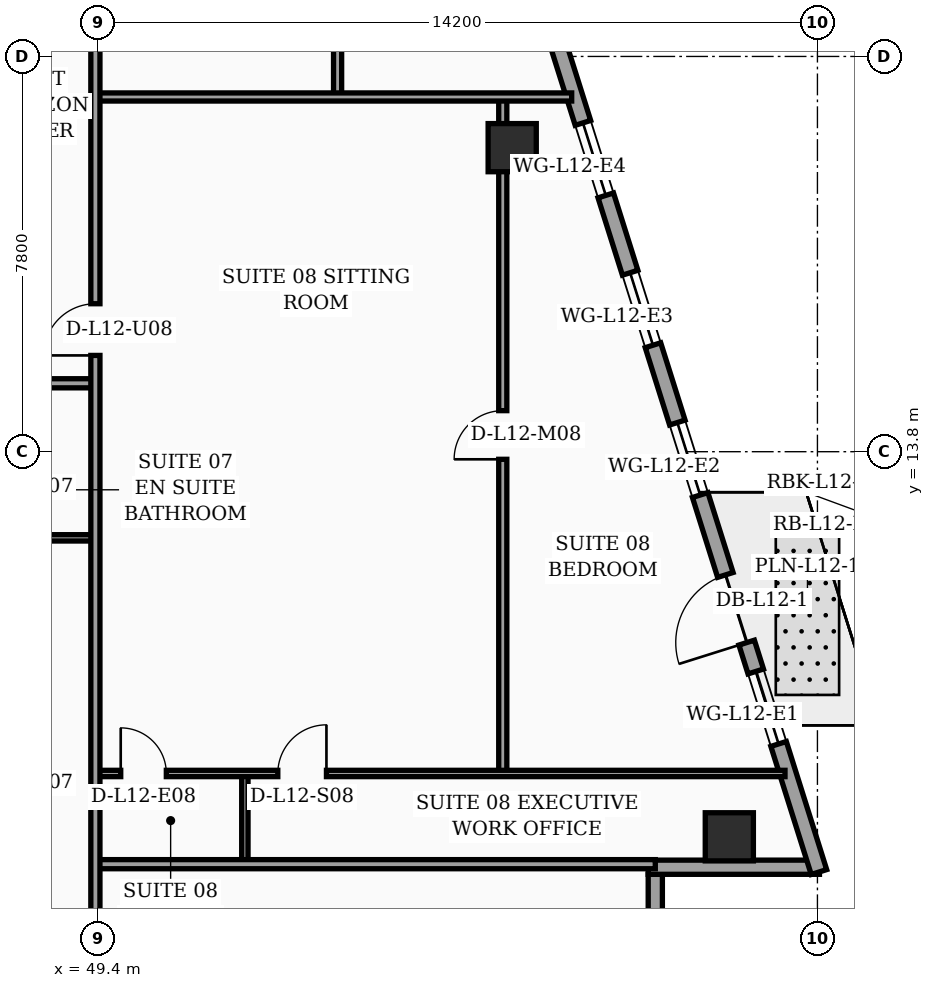
"""IFC4 building model, lengths in metres.
Left out: names, types, materials, properties, quantities, classifications, styles, units other than length and angle.
Written with IfcOpenShell. Run it as: python <this file> out.ifc"""

import sys

from ifc_helpers import new_model, si_unit, direction, frame, frame_2d, origin, origin_2d, place, context, subcontext, project, spatial, rectangle, hollow_rectangle, extrude, element, fill, save


model = new_model("IFC4")
c1 = context("Model", 3, precision=1e-05, world=origin(), true_north=direction((0.0, 1.0)))
c2 = subcontext(c1, "Body", "Model", "MODEL_VIEW")
j1 = project(units=[si_unit("LENGTHUNIT", "METRE"), si_unit("PLANEANGLEUNIT", "RADIAN")], contexts=[c1])
p1 = place(None, origin())
s1 = spatial("IfcSite", under=j1, at=p1, CompositionType="ELEMENT")
p2 = place(p1, origin())
s2 = spatial("IfcBuilding", under=s1, at=p2, CompositionType="ELEMENT")
p3 = place(p2, frame((0.0, 0.0, 54.6)))
s3 = spatial("IfcBuildingStorey", under=s2, at=p3, CompositionType="ELEMENT", Elevation=54.6)
for number, where, z_axis, x_axis in (
    (1, (61.861, 6.2, 0.0), (0.0, 0.0, 1.0), (1.0, 0.0, 0.0)),
    (2, (57.576, 19.8, 0.0), (0.0, 0.0, 1.0), (1.0, 0.0, 0.0)),
):
    element("IfcColumn", number, at=place(p3, frame(where, z_axis=z_axis, x_axis=x_axis)), inside=s3, PredefinedType="COLUMN", context=c2, shape_type="SweptSolid", body=[
        extrude(hollow_rectangle(XDim=0.95, YDim=0.95, WallThickness=0.04, at=origin_2d()), origin(), (0.0, 0.0, 1.0), 3.56),
    ])
p4 = place(p3, frame((60.4, 2.52, 0.0), z_axis=(0.0, 0.0, 1.0), x_axis=(0.0, 1.0, 0.0)))
e3 = element("IfcWall", 3, at=p4, inside=s3, PredefinedType="SOLIDWALL", context=c2, shape_type="SweptSolid", body=[
    extrude(rectangle(XDim=2.94, YDim=0.28, at=frame_2d((1.47, 0.0))), origin(), (0.0, 0.0, 1.0), 3.04),
])
p5 = place(p3, frame((60.26, 5.6, 0.0), z_axis=(0.0, 0.0, 1.0), x_axis=(1.0, 0.0, 0.0)))
e4 = element("IfcWall", 4, at=p5, inside=s3, PredefinedType="SOLIDWALL", context=c2, shape_type="SweptSolid", body=[
    extrude(rectangle(XDim=3.38, YDim=0.28, at=frame_2d((1.69, 0.0))), origin(), (0.0, 0.0, 1.0), 3.04),
])
p6 = place(p3, frame((63.63, 5.505, 0.0), z_axis=(0.0, 0.0, 1.0), x_axis=(-0.300501856448, 0.953781229775, 0.0)))
e5 = element("IfcWall", 5, at=p6, inside=s3, PredefinedType="SOLIDWALL", context=c2, shape_type="SweptSolid", body=[
    extrude(rectangle(XDim=30.814, YDim=0.32, at=frame_2d((15.407, 0.0))), origin(), (0.0, 0.0, 1.0), 3.56),
])
p7 = place(p6, frame((4.747, 0.0, 0.0)))
e6 = element("IfcOpeningElement", 6, at=p7, cuts=e5, PredefinedType="OPENING", context=c2, shape_type="SweptSolid", body=[
    extrude(rectangle(XDim=1.4, YDim=2.25, at=frame_2d((0.7, 1.125))), frame((0.0, 0.17, 0.0), z_axis=(0.0, -1.0, 0.0), x_axis=(1.0, 0.0, 0.0)), (0.0, 0.0, 1.0), 0.34),
])
p8 = place(p6, frame((2.65, 0.0, 0.75)))
e7 = element("IfcOpeningElement", 7, at=p8, cuts=e5, PredefinedType="OPENING", context=c2, shape_type="SweptSolid", body=[
    extrude(rectangle(XDim=1.5, YDim=1.6, at=frame_2d((0.75, 0.8))), frame((0.0, 0.17, 0.0), z_axis=(0.0, -1.0, 0.0), x_axis=(1.0, 0.0, 0.0)), (0.0, 0.0, 1.0), 0.34),
])
p9 = place(p6, frame((7.8, 0.0, 0.75)))
e8 = element("IfcOpeningElement", 8, at=p9, cuts=e5, PredefinedType="OPENING", context=c2, shape_type="SweptSolid", body=[
    extrude(rectangle(XDim=1.5, YDim=1.6, at=frame_2d((0.75, 0.8))), frame((0.0, 0.17, 0.0), z_axis=(0.0, -1.0, 0.0), x_axis=(1.0, 0.0, 0.0)), (0.0, 0.0, 1.0), 0.34),
])
p10 = place(p6, frame((10.9, 0.0, 0.75)))
e9 = element("IfcOpeningElement", 9, at=p10, cuts=e5, PredefinedType="OPENING", context=c2, shape_type="SweptSolid", body=[
    extrude(rectangle(XDim=1.5, YDim=1.6, at=frame_2d((0.75, 0.8))), frame((0.0, 0.17, 0.0), z_axis=(0.0, -1.0, 0.0), x_axis=(1.0, 0.0, 0.0)), (0.0, 0.0, 1.0), 0.34),
])
p11 = place(p6, frame((14.0, 0.0, 0.75)))
e10 = element("IfcOpeningElement", 10, at=p11, cuts=e5, PredefinedType="OPENING", context=c2, shape_type="SweptSolid", body=[
    extrude(rectangle(XDim=1.5, YDim=1.6, at=frame_2d((0.75, 0.8))), frame((0.0, 0.17, 0.0), z_axis=(0.0, -1.0, 0.0), x_axis=(1.0, 0.0, 0.0)), (0.0, 0.0, 1.0), 0.34),
])
p12 = place(p6, frame((17.1, 0.0, 0.75)))
e11 = element("IfcOpeningElement", 11, at=p12, cuts=e5, PredefinedType="OPENING", context=c2, shape_type="SweptSolid", body=[
    extrude(rectangle(XDim=1.5, YDim=1.6, at=frame_2d((0.75, 0.8))), frame((0.0, 0.17, 0.0), z_axis=(0.0, -1.0, 0.0), x_axis=(1.0, 0.0, 0.0)), (0.0, 0.0, 1.0), 0.34),
])
p13 = place(p6, frame((20.2, 0.0, 0.75)))
e12 = element("IfcOpeningElement", 12, at=p13, cuts=e5, PredefinedType="OPENING", context=c2, shape_type="SweptSolid", body=[
    extrude(rectangle(XDim=1.5, YDim=1.6, at=frame_2d((0.75, 0.8))), frame((0.0, 0.17, 0.0), z_axis=(0.0, -1.0, 0.0), x_axis=(1.0, 0.0, 0.0)), (0.0, 0.0, 1.0), 0.34),
])
p14 = place(p6, frame((26.4, 0.0, 0.75)))
e13 = element("IfcOpeningElement", 13, at=p14, cuts=e5, PredefinedType="OPENING", context=c2, shape_type="SweptSolid", body=[
    extrude(rectangle(XDim=1.5, YDim=1.6, at=frame_2d((0.75, 0.8))), frame((0.0, 0.17, 0.0), z_axis=(0.0, -1.0, 0.0), x_axis=(1.0, 0.0, 0.0)), (0.0, 0.0, 1.0), 0.34),
])
p15 = place(p3, frame((47.42, 12.1, 0.0), z_axis=(0.0, 0.0, 1.0), x_axis=(1.0, 0.0, 0.0)))
e14 = element("IfcWall", 14, at=p15, inside=s3, PredefinedType="PARTITIONING", context=c2, shape_type="SweptSolid", body=[
    extrude(rectangle(XDim=1.93, YDim=0.125, at=frame_2d((0.965, 0.0))), origin(), (0.0, 0.0, 1.0), 2.84),
])
p16 = place(p3, frame((32.4, 15.15, 0.0), z_axis=(0.0, 0.0, 1.0), x_axis=(1.0, 0.0, 0.0)))
e15 = element("IfcWall", 15, at=p16, inside=s3, PredefinedType="PARTITIONING", context=c2, shape_type="SweptSolid", body=[
    extrude(rectangle(XDim=16.95, YDim=0.18, at=frame_2d((8.475, 0.0))), origin(), (0.0, 0.0, 1.0), 2.84),
])
p17 = place(p16, frame((1.99, 0.0, 0.0)))
e16 = element("IfcOpeningElement", 16, at=p17, cuts=e15, PredefinedType="OPENING", context=c2, shape_type="SweptSolid", body=[
    extrude(rectangle(XDim=1.02, YDim=2.2, at=frame_2d((0.51, 1.1))), frame((0.0, 0.1, 0.0), z_axis=(0.0, -1.0, 0.0), x_axis=(1.0, 0.0, 0.0)), (0.0, 0.0, 1.0), 0.2),
])
p18 = place(p16, frame((7.58, 0.0, 0.0)))
e17 = element("IfcOpeningElement", 17, at=p18, cuts=e15, PredefinedType="OPENING", context=c2, shape_type="SweptSolid", body=[
    extrude(rectangle(XDim=1.02, YDim=2.2, at=frame_2d((0.51, 1.1))), frame((0.0, 0.1, 0.0), z_axis=(0.0, -1.0, 0.0), x_axis=(1.0, 0.0, 0.0)), (0.0, 0.0, 1.0), 0.2),
])
p19 = place(p16, frame((12.69, 0.0, 0.0)))
e18 = element("IfcOpeningElement", 18, at=p19, cuts=e15, PredefinedType="OPENING", context=c2, shape_type="SweptSolid", body=[
    extrude(rectangle(XDim=1.02, YDim=2.2, at=frame_2d((0.51, 1.1))), frame((0.0, 0.1, 0.0), z_axis=(0.0, -1.0, 0.0), x_axis=(1.0, 0.0, 0.0)), (0.0, 0.0, 1.0), 0.2),
])
p20 = place(p3, frame((52.3, 5.66, 0.0), z_axis=(0.0, 0.0, 1.0), x_axis=(0.0, 1.0, 0.0)))
e19 = element("IfcWall", 19, at=p20, inside=s3, PredefinedType="PARTITIONING", context=c2, shape_type="SweptSolid", body=[
    extrude(rectangle(XDim=1.79, YDim=0.125, at=frame_2d((0.895, 0.0))), origin(), (0.0, 0.0, 1.0), 3.56),
])
p21 = place(p3, frame((57.39, 7.45, 0.0), z_axis=(0.0, 0.0, 1.0), x_axis=(0.0, 1.0, 0.0)))
e20 = element("IfcWall", 20, at=p21, inside=s3, PredefinedType="PARTITIONING", context=c2, shape_type="SweptSolid", body=[
    extrude(rectangle(XDim=13.35, YDim=0.16, at=frame_2d((6.675, 0.0))), origin(), (0.0, 0.0, 1.0), 2.84),
])
p22 = place(p21, frame((6.2, 0.0, 0.0)))
e21 = element("IfcOpeningElement", 21, at=p22, cuts=e20, PredefinedType="OPENING", context=c2, shape_type="SweptSolid", body=[
    extrude(rectangle(XDim=0.96, YDim=2.2, at=frame_2d((0.48, 1.1))), frame((0.0, 0.09, 0.0), z_axis=(0.0, -1.0, 0.0), x_axis=(1.0, 0.0, 0.0)), (0.0, 0.0, 1.0), 0.18),
])
p23 = place(p3, frame((49.35, 7.45, 0.0), z_axis=(0.0, 0.0, 1.0), x_axis=(1.0, 0.0, 0.0)))
e22 = element("IfcWall", 22, at=p23, inside=s3, PredefinedType="PARTITIONING", context=c2, shape_type="SweptSolid", body=[
    extrude(rectangle(XDim=13.61, YDim=0.125, at=frame_2d((6.805, 0.0))), origin(), (0.0, 0.0, 1.0), 3.04),
])
p24 = place(p23, frame((0.5, 0.0, 0.0)))
e23 = element("IfcOpeningElement", 23, at=p24, cuts=e22, PredefinedType="OPENING", context=c2, shape_type="SweptSolid", body=[
    extrude(rectangle(XDim=0.9, YDim=2.15, at=frame_2d((0.45, 1.075))), frame((0.0, 0.073, 0.0), z_axis=(0.0, -1.0, 0.0), x_axis=(1.0, 0.0, 0.0)), (0.0, 0.0, 1.0), 0.145),
])
p25 = place(p23, frame((3.6, 0.0, 0.0)))
e24 = element("IfcOpeningElement", 24, at=p25, cuts=e22, PredefinedType="OPENING", context=c2, shape_type="SweptSolid", body=[
    extrude(rectangle(XDim=0.96, YDim=2.2, at=frame_2d((0.48, 1.1))), frame((0.0, 0.073, 0.0), z_axis=(0.0, -1.0, 0.0), x_axis=(1.0, 0.0, 0.0)), (0.0, 0.0, 1.0), 0.145),
])
p26 = place(p3, frame((49.35, 5.66, 0.0), z_axis=(0.0, 0.0, 1.0), x_axis=(1.0, 0.0, 0.0)))
e25 = element("IfcWall", 25, at=p26, inside=s3, PredefinedType="PARTITIONING", context=c2, shape_type="SweptSolid", body=[
    extrude(rectangle(XDim=11.05, YDim=0.18, at=frame_2d((5.525, 0.0))), origin(), (0.0, 0.0, 1.0), 2.84),
])
p27 = place(p3, frame((54.13, 20.8, 0.0), z_axis=(0.0, 0.0, 1.0), x_axis=(0.0, 1.0, 0.0)))
e26 = element("IfcWall", 26, at=p27, inside=s3, PredefinedType="PARTITIONING", context=c2, shape_type="SweptSolid", body=[
    extrude(rectangle(XDim=7.35, YDim=0.16, at=frame_2d((3.675, 0.0))), origin(), (0.0, 0.0, 1.0), 3.19),
])
p28 = place(p27, frame((3.19, 0.0, 0.0)))
e27 = element("IfcOpeningElement", 27, at=p28, cuts=e26, PredefinedType="OPENING", context=c2, shape_type="SweptSolid", body=[
    extrude(rectangle(XDim=0.96, YDim=2.2, at=frame_2d((0.48, 1.1))), frame((0.0, 0.09, 0.0), z_axis=(0.0, -1.0, 0.0), x_axis=(1.0, 0.0, 0.0)), (0.0, 0.0, 1.0), 0.18),
])
p29 = place(p3, frame((49.35, 20.8, 0.0), z_axis=(0.0, 0.0, 1.0), x_axis=(1.0, 0.0, 0.0)))
e28 = element("IfcWall", 28, at=p29, inside=s3, PredefinedType="PARTITIONING", context=c2, shape_type="SweptSolid", body=[
    extrude(rectangle(XDim=9.4, YDim=0.16, at=frame_2d((4.7, 0.0))), origin(), (0.0, 0.0, 1.0), 3.04),
])
p30 = place(p3, frame((49.35, 2.44, 0.0), z_axis=(0.0, 0.0, 1.0), x_axis=(0.0, 1.0, 0.0)))
e29 = element("IfcWall", 29, at=p30, inside=s3, PredefinedType="PARTITIONING", context=c2, shape_type="SweptSolid", body=[
    extrude(rectangle(XDim=27.84, YDim=0.18, at=frame_2d((13.92, 0.0))), origin(), (0.0, 0.0, 1.0), 2.84),
])
p31 = place(p30, frame((13.26, 0.0, 0.0)))
e30 = element("IfcOpeningElement", 30, at=p31, cuts=e29, PredefinedType="OPENING", context=c2, shape_type="SweptSolid", body=[
    extrude(rectangle(XDim=1.02, YDim=2.2, at=frame_2d((0.51, 1.1))), frame((0.0, 0.1, 0.0), z_axis=(0.0, -1.0, 0.0), x_axis=(1.0, 0.0, 0.0)), (0.0, 0.0, 1.0), 0.2),
])
p32 = place(p30, frame((21.52, 0.0, 0.0)))
e31 = element("IfcOpeningElement", 31, at=p32, cuts=e29, PredefinedType="OPENING", context=c2, shape_type="SweptSolid", body=[
    extrude(rectangle(XDim=1.02, YDim=2.2, at=frame_2d((0.51, 1.1))), frame((0.0, 0.1, 0.0), z_axis=(0.0, -1.0, 0.0), x_axis=(1.0, 0.0, 0.0)), (0.0, 0.0, 1.0), 0.2),
])
p33 = place(p7, origin())
e32 = element("IfcDoor", 32, at=p33, inside=s3, OperationType="SINGLE_SWING_LEFT", PredefinedType="DOOR", context=c2, shape_type="SweptSolid", body=[
    extrude(rectangle(XDim=1.4, YDim=2.25, at=frame_2d((0.7, 1.125))), frame((0.0, 0.025, 0.0), z_axis=(0.0, -1.0, 0.0), x_axis=(1.0, 0.0, 0.0)), (0.0, 0.0, 1.0), 0.05),
])
fill(e6, e32)
p34 = place(p8, origin())
e33 = element("IfcWindow", 33, at=p34, inside=s3, PartitioningType="SINGLE_PANEL", PredefinedType="WINDOW", context=c2, shape_type="SweptSolid", body=[
    extrude(rectangle(XDim=1.5, YDim=1.6, at=frame_2d((0.75, 0.8))), frame((0.0, 0.03, 0.0), z_axis=(0.0, -1.0, 0.0), x_axis=(1.0, 0.0, 0.0)), (0.0, 0.0, 1.0), 0.06),
])
fill(e7, e33)
p35 = place(p9, origin())
e34 = element("IfcWindow", 34, at=p35, inside=s3, PartitioningType="SINGLE_PANEL", PredefinedType="WINDOW", context=c2, shape_type="SweptSolid", body=[
    extrude(rectangle(XDim=1.5, YDim=1.6, at=frame_2d((0.75, 0.8))), frame((0.0, 0.03, 0.0), z_axis=(0.0, -1.0, 0.0), x_axis=(1.0, 0.0, 0.0)), (0.0, 0.0, 1.0), 0.06),
])
fill(e8, e34)
p36 = place(p10, origin())
e35 = element("IfcWindow", 35, at=p36, inside=s3, PartitioningType="SINGLE_PANEL", PredefinedType="WINDOW", context=c2, shape_type="SweptSolid", body=[
    extrude(rectangle(XDim=1.5, YDim=1.6, at=frame_2d((0.75, 0.8))), frame((0.0, 0.03, 0.0), z_axis=(0.0, -1.0, 0.0), x_axis=(1.0, 0.0, 0.0)), (0.0, 0.0, 1.0), 0.06),
])
fill(e9, e35)
p37 = place(p11, origin())
e36 = element("IfcWindow", 36, at=p37, inside=s3, PartitioningType="SINGLE_PANEL", PredefinedType="WINDOW", context=c2, shape_type="SweptSolid", body=[
    extrude(rectangle(XDim=1.5, YDim=1.6, at=frame_2d((0.75, 0.8))), frame((0.0, 0.03, 0.0), z_axis=(0.0, -1.0, 0.0), x_axis=(1.0, 0.0, 0.0)), (0.0, 0.0, 1.0), 0.06),
])
fill(e10, e36)
p38 = place(p22, origin())
e37 = element("IfcDoor", 37, at=p38, inside=s3, OperationType="SINGLE_SWING_LEFT", PredefinedType="DOOR", context=c2, shape_type="SweptSolid", body=[
    extrude(rectangle(XDim=0.96, YDim=2.2, at=frame_2d((0.48, 1.1))), frame((0.0, 0.025, 0.0), z_axis=(0.0, -1.0, 0.0), x_axis=(1.0, 0.0, 0.0)), (0.0, 0.0, 1.0), 0.05),
])
fill(e21, e37)
p39 = place(p24, origin())
e38 = element("IfcDoor", 38, at=p39, inside=s3, OperationType="SINGLE_SWING_LEFT", PredefinedType="DOOR", context=c2, shape_type="SweptSolid", body=[
    extrude(rectangle(XDim=0.9, YDim=2.15, at=frame_2d((0.45, 1.075))), frame((0.0, 0.025, 0.0), z_axis=(0.0, -1.0, 0.0), x_axis=(1.0, 0.0, 0.0)), (0.0, 0.0, 1.0), 0.05),
])
fill(e23, e38)
p40 = place(p25, origin())
e39 = element("IfcDoor", 39, at=p40, inside=s3, OperationType="SINGLE_SWING_RIGHT", PredefinedType="DOOR", context=c2, shape_type="SweptSolid", body=[
    extrude(rectangle(XDim=0.96, YDim=2.2, at=frame_2d((0.48, 1.1))), frame((0.0, 0.025, 0.0), z_axis=(0.0, -1.0, 0.0), x_axis=(1.0, 0.0, 0.0)), (0.0, 0.0, 1.0), 0.05),
])
fill(e24, e39)
p41 = place(p31, origin())
e40 = element("IfcDoor", 40, at=p41, inside=s3, OperationType="SINGLE_SWING_LEFT", PredefinedType="DOOR", context=c2, shape_type="SweptSolid", body=[
    extrude(rectangle(XDim=1.02, YDim=2.2, at=frame_2d((0.51, 1.1))), frame((0.0, 0.025, 0.0), z_axis=(0.0, -1.0, 0.0), x_axis=(1.0, 0.0, 0.0)), (0.0, 0.0, 1.0), 0.05),
])
fill(e30, e40)
save(model, sys.argv[1])
